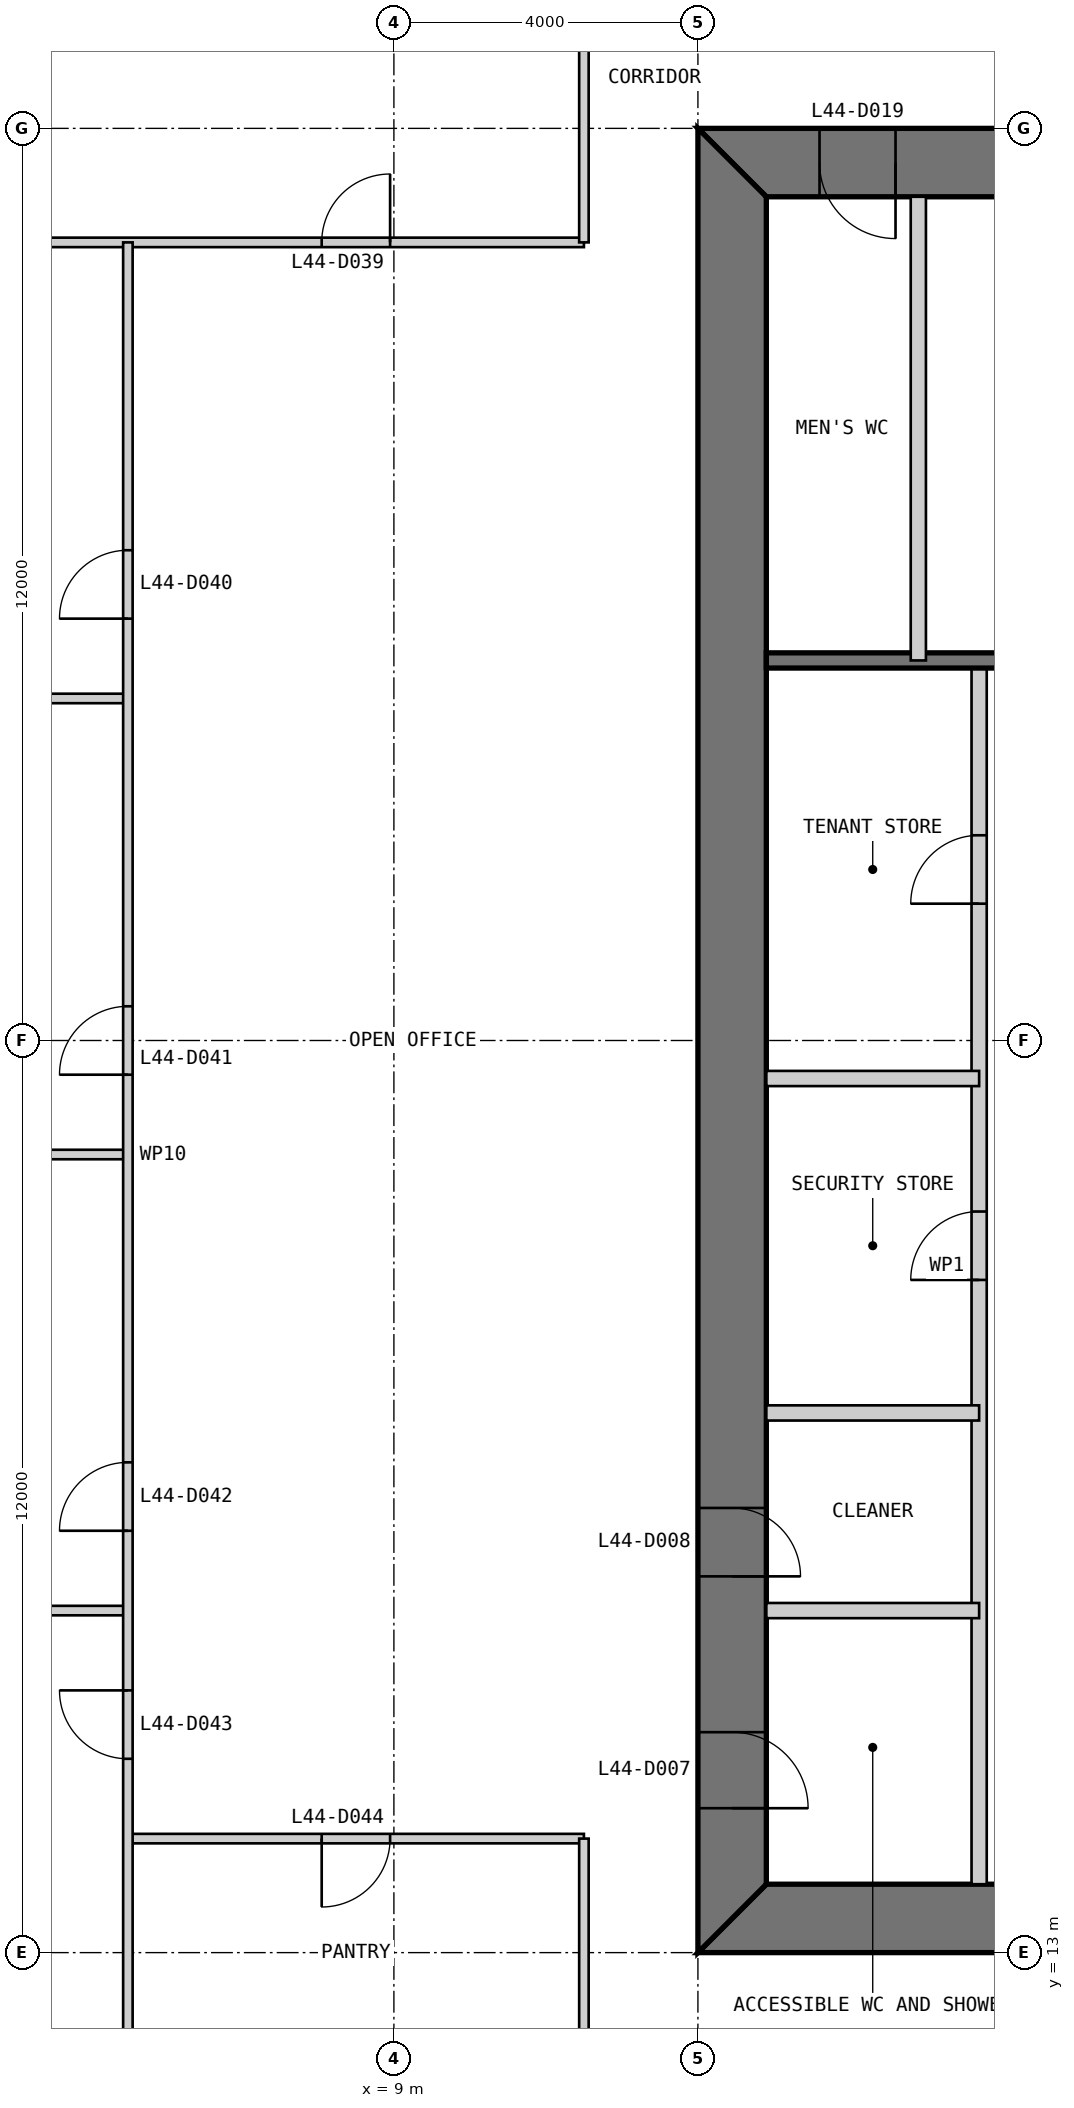
"""IFC4 building model, lengths in metres.
Left out: names, types, materials, properties, quantities, classifications, styles, units other than length and angle.
Written with IfcOpenShell. Run it as: python <this file> out.ifc"""

import sys

from ifc_helpers import new_model, si_unit, direction, frame, frame_2d, origin, place, context, subcontext, project, spatial, polyline, rectangle, outline, extrude, element, fill, save


model = new_model("IFC4")
c1 = context("Model", 3, precision=1e-05, world=origin(), true_north=direction((0.0, 1.0)))
c2 = subcontext(c1, "Body", "Model", "MODEL_VIEW")
j1 = project(units=[si_unit("LENGTHUNIT", "METRE"), si_unit("PLANEANGLEUNIT", "RADIAN")], contexts=[c1])
p1 = place(None, origin())
s1 = spatial("IfcSite", under=j1, at=p1, CompositionType="ELEMENT")
p2 = place(p1, origin())
s2 = spatial("IfcBuilding", under=s1, at=p2, CompositionType="ELEMENT")
p3 = place(p2, frame((0.0, 0.0, 189.8)))
s3 = spatial("IfcBuildingStorey", under=s2, at=p3, CompositionType="ELEMENT", Elevation=189.8)
p4 = place(p3, frame((13.0, 13.45, 0.0), z_axis=(0.0, 0.0, 1.0), x_axis=(1.0, 0.0, 0.0)))
e1 = element("IfcWall", 1, at=p4, inside=s3, PredefinedType="SHEAR", context=c2, shape_type="SweptSolid", body=[
    extrude(outline(polyline([(0.0, -0.45), (24.0, -0.45), (23.1, 0.45), (0.9, 0.45), (0.0, -0.45)])), origin(), (0.0, 0.0, 1.0), 4.0),
])
p5 = place(p4, frame((4.9, 0.0, 0.0)))
e2 = element("IfcOpeningElement", 2, at=p5, cuts=e1, PredefinedType="OPENING", context=c2, shape_type="SweptSolid", body=[
    extrude(rectangle(XDim=1.0, YDim=2.2, at=frame_2d((0.5, 1.1))), frame((0.0, 0.46, 0.0), z_axis=(0.0, -1.0, 0.0), x_axis=(1.0, 0.0, 0.0)), (0.0, 0.0, 1.0), 0.92),
])
p6 = place(p4, frame((8.9, 0.0, 0.0)))
e3 = element("IfcOpeningElement", 3, at=p6, cuts=e1, PredefinedType="OPENING", context=c2, shape_type="SweptSolid", body=[
    extrude(rectangle(XDim=1.1, YDim=2.2, at=frame_2d((0.55, 1.1))), frame((0.0, 0.46, 0.0), z_axis=(0.0, -1.0, 0.0), x_axis=(1.0, 0.0, 0.0)), (0.0, 0.0, 1.0), 0.92),
])
p7 = place(p4, frame((15.05, 0.0, 0.0)))
e4 = element("IfcOpeningElement", 4, at=p7, cuts=e1, PredefinedType="OPENING", context=c2, shape_type="SweptSolid", body=[
    extrude(rectangle(XDim=0.9, YDim=2.2, at=frame_2d((0.45, 1.1))), frame((0.0, 0.46, 0.0), z_axis=(0.0, -1.0, 0.0), x_axis=(1.0, 0.0, 0.0)), (0.0, 0.0, 1.0), 0.92),
])
p8 = place(p4, frame((17.9, 0.0, 0.0)))
e5 = element("IfcOpeningElement", 5, at=p8, cuts=e1, PredefinedType="OPENING", context=c2, shape_type="SweptSolid", body=[
    extrude(rectangle(XDim=1.0, YDim=2.2, at=frame_2d((0.5, 1.1))), frame((0.0, 0.46, 0.0), z_axis=(0.0, -1.0, 0.0), x_axis=(1.0, 0.0, 0.0)), (0.0, 0.0, 1.0), 0.92),
])
p9 = place(p4, frame((21.4, 0.0, 0.0)))
e6 = element("IfcOpeningElement", 6, at=p9, cuts=e1, PredefinedType="OPENING", context=c2, shape_type="SweptSolid", body=[
    extrude(rectangle(XDim=1.0, YDim=2.2, at=frame_2d((0.5, 1.1))), frame((0.0, 0.46, 0.0), z_axis=(0.0, -1.0, 0.0), x_axis=(1.0, 0.0, 0.0)), (0.0, 0.0, 1.0), 0.92),
])
p10 = place(p3, frame((37.0, 36.55, 0.0), z_axis=(0.0, 0.0, 1.0), x_axis=(-1.0, 0.0, 0.0)))
e7 = element("IfcWall", 7, at=p10, inside=s3, PredefinedType="SHEAR", context=c2, shape_type="SweptSolid", body=[
    extrude(outline(polyline([(0.0, -0.45), (24.0, -0.45), (23.1, 0.45), (0.9, 0.45), (0.0, -0.45)])), origin(), (0.0, 0.0, 1.0), 4.0),
])
p11 = place(p10, frame((4.9, 0.0, 0.0)))
e8 = element("IfcOpeningElement", 8, at=p11, cuts=e7, PredefinedType="OPENING", context=c2, shape_type="SweptSolid", body=[
    extrude(rectangle(XDim=1.0, YDim=2.2, at=frame_2d((0.5, 1.1))), frame((0.0, 0.46, 0.0), z_axis=(0.0, -1.0, 0.0), x_axis=(1.0, 0.0, 0.0)), (0.0, 0.0, 1.0), 0.92),
])
p12 = place(p10, frame((8.9, 0.0, 0.0)))
e9 = element("IfcOpeningElement", 9, at=p12, cuts=e7, PredefinedType="OPENING", context=c2, shape_type="SweptSolid", body=[
    extrude(rectangle(XDim=1.1, YDim=2.2, at=frame_2d((0.55, 1.1))), frame((0.0, 0.46, 0.0), z_axis=(0.0, -1.0, 0.0), x_axis=(1.0, 0.0, 0.0)), (0.0, 0.0, 1.0), 0.92),
])
p13 = place(p10, frame((15.05, 0.0, 0.0)))
e10 = element("IfcOpeningElement", 10, at=p13, cuts=e7, PredefinedType="OPENING", context=c2, shape_type="SweptSolid", body=[
    extrude(rectangle(XDim=0.9, YDim=2.2, at=frame_2d((0.45, 1.1))), frame((0.0, 0.46, 0.0), z_axis=(0.0, -1.0, 0.0), x_axis=(1.0, 0.0, 0.0)), (0.0, 0.0, 1.0), 0.92),
])
p14 = place(p10, frame((17.9, 0.0, 0.0)))
e11 = element("IfcOpeningElement", 11, at=p14, cuts=e7, PredefinedType="OPENING", context=c2, shape_type="SweptSolid", body=[
    extrude(rectangle(XDim=1.0, YDim=2.2, at=frame_2d((0.5, 1.1))), frame((0.0, 0.46, 0.0), z_axis=(0.0, -1.0, 0.0), x_axis=(1.0, 0.0, 0.0)), (0.0, 0.0, 1.0), 0.92),
])
p15 = place(p10, frame((21.4, 0.0, 0.0)))
e12 = element("IfcOpeningElement", 12, at=p15, cuts=e7, PredefinedType="OPENING", context=c2, shape_type="SweptSolid", body=[
    extrude(rectangle(XDim=1.0, YDim=2.2, at=frame_2d((0.5, 1.1))), frame((0.0, 0.46, 0.0), z_axis=(0.0, -1.0, 0.0), x_axis=(1.0, 0.0, 0.0)), (0.0, 0.0, 1.0), 0.92),
])
p16 = place(p3, frame((13.45, 36.1, 0.0), z_axis=(0.0, 0.0, 1.0), x_axis=(0.0, -1.0, 0.0)))
e13 = element("IfcWall", 13, at=p16, inside=s3, PredefinedType="SHEAR", context=c2, shape_type="SweptSolid", body=[
    extrude(outline(polyline([(-0.9, -0.45), (23.1, -0.45), (22.2, 0.45), (0.0, 0.45), (-0.9, -0.45)])), origin(), (0.0, 0.0, 1.0), 4.0),
])
p17 = place(p16, frame((20.2, 0.0, 0.0)))
e14 = element("IfcOpeningElement", 14, at=p17, cuts=e13, PredefinedType="OPENING", context=c2, shape_type="SweptSolid", body=[
    extrude(rectangle(XDim=1.0, YDim=2.2, at=frame_2d((0.5, 1.1))), frame((0.0, 0.46, 0.0), z_axis=(0.0, -1.0, 0.0), x_axis=(1.0, 0.0, 0.0)), (0.0, 0.0, 1.0), 0.92),
])
p18 = place(p16, frame((17.25, 0.0, 0.0)))
e15 = element("IfcOpeningElement", 15, at=p18, cuts=e13, PredefinedType="OPENING", context=c2, shape_type="SweptSolid", body=[
    extrude(rectangle(XDim=0.9, YDim=2.2, at=frame_2d((0.45, 1.1))), frame((0.0, 0.46, 0.0), z_axis=(0.0, -1.0, 0.0), x_axis=(1.0, 0.0, 0.0)), (0.0, 0.0, 1.0), 0.92),
])
p19 = place(p3, frame((16.7, 13.9, 0.0), z_axis=(0.0, 0.0, 1.0), x_axis=(0.0, 1.0, 0.0)))
e16 = element("IfcWall", 16, at=p19, inside=s3, PredefinedType="PARTITIONING", context=c2, shape_type="SweptSolid", body=[
    extrude(rectangle(XDim=16.1, YDim=0.2, at=frame_2d((8.05, 0.0))), origin(), (0.0, 0.0, 1.0), 3.8),
])
p20 = place(p19, frame((7.95, 0.0, 0.0)))
e17 = element("IfcOpeningElement", 17, at=p20, cuts=e16, PredefinedType="OPENING", context=c2, shape_type="SweptSolid", body=[
    extrude(rectangle(XDim=0.9, YDim=2.2, at=frame_2d((0.45, 1.1))), frame((0.0, 0.11, 0.0), z_axis=(0.0, -1.0, 0.0), x_axis=(1.0, 0.0, 0.0)), (0.0, 0.0, 1.0), 0.22),
])
p21 = place(p19, frame((12.9, 0.0, 0.0)))
e18 = element("IfcOpeningElement", 18, at=p21, cuts=e16, PredefinedType="OPENING", context=c2, shape_type="SweptSolid", body=[
    extrude(rectangle(XDim=0.9, YDim=2.2, at=frame_2d((0.45, 1.1))), frame((0.0, 0.11, 0.0), z_axis=(0.0, -1.0, 0.0), x_axis=(1.0, 0.0, 0.0)), (0.0, 0.0, 1.0), 0.22),
])
for number, where, z_axis, x_axis in (
    (19, (13.9, 17.5, 0.0), (0.0, 0.0, 1.0), (1.0, 0.0, 0.0)),
    (20, (13.9, 20.1, 0.0), (0.0, 0.0, 1.0), (1.0, 0.0, 0.0)),
    (21, (13.9, 24.5, 0.0), (0.0, 0.0, 1.0), (1.0, 0.0, 0.0)),
):
    element("IfcWall", number, at=place(p3, frame(where, z_axis=z_axis, x_axis=x_axis)), inside=s3, PredefinedType="PARTITIONING", context=c2, shape_type="SweptSolid", body=[
        extrude(rectangle(XDim=2.8, YDim=0.2, at=frame_2d((1.4, 0.0))), origin(), (0.0, 0.0, 1.0), 3.8),
    ])
p22 = place(p3, frame((29.7, 30.0, 0.0), z_axis=(0.0, 0.0, 1.0), x_axis=(-1.0, 0.0, 0.0)))
e22 = element("IfcWall", 22, at=p22, inside=s3, PredefinedType="SOLIDWALL", context=c2, shape_type="SweptSolid", body=[
    extrude(rectangle(XDim=15.8, YDim=0.2, at=frame_2d((7.9, 0.0))), origin(), (0.0, 0.0, 1.0), 3.8),
])
p23 = place(p3, frame((15.9, 36.1, 0.0), z_axis=(0.0, 0.0, 1.0), x_axis=(0.0, -1.0, 0.0)))
e23 = element("IfcWall", 23, at=p23, inside=s3, PredefinedType="PARTITIONING", context=c2, shape_type="SweptSolid", body=[
    extrude(rectangle(XDim=6.1, YDim=0.2, at=frame_2d((3.05, 0.0))), origin(), (0.0, 0.0, 1.0), 3.8),
])
p24 = place(p3, frame((0.15, 35.5, 0.0), z_axis=(0.0, 0.0, 1.0), x_axis=(1.0, 0.0, 0.0)))
e24 = element("IfcWall", 24, at=p24, inside=s3, PredefinedType="PARTITIONING", context=c2, shape_type="SweptSolid", body=[
    extrude(rectangle(XDim=11.35, YDim=0.125, at=frame_2d((5.675, 0.0))), origin(), (0.0, 0.0, 1.0), 3.85),
])
p25 = place(p24, frame((7.9, 0.0, 0.0)))
e25 = element("IfcOpeningElement", 25, at=p25, cuts=e24, PredefinedType="OPENING", context=c2, shape_type="SweptSolid", body=[
    extrude(rectangle(XDim=0.9, YDim=2.2, at=frame_2d((0.45, 1.1))), frame((0.0, 0.073, 0.0), z_axis=(0.0, -1.0, 0.0), x_axis=(1.0, 0.0, 0.0)), (0.0, 0.0, 1.0), 0.145),
])
for number, where, z_axis, x_axis in (
    (26, (0.15, 29.5, 0.0), (0.0, 0.0, 1.0), (1.0, 0.0, 0.0)),
    (27, (0.15, 23.5, 0.0), (0.0, 0.0, 1.0), (1.0, 0.0, 0.0)),
    (28, (0.15, 17.5, 0.0), (0.0, 0.0, 1.0), (1.0, 0.0, 0.0)),
):
    element("IfcWall", number, at=place(p3, frame(where, z_axis=z_axis, x_axis=x_axis)), inside=s3, PredefinedType="PARTITIONING", context=c2, shape_type="SweptSolid", body=[
        extrude(rectangle(XDim=5.35, YDim=0.125, at=frame_2d((2.675, 0.0))), origin(), (0.0, 0.0, 1.0), 3.85),
    ])
p26 = place(p3, frame((5.5, 14.5, 0.0), z_axis=(0.0, 0.0, 1.0), x_axis=(1.0, 0.0, 0.0)))
e29 = element("IfcWall", 29, at=p26, inside=s3, PredefinedType="PARTITIONING", context=c2, shape_type="SweptSolid", body=[
    extrude(rectangle(XDim=6.0, YDim=0.125, at=frame_2d((3.0, 0.0))), origin(), (0.0, 0.0, 1.0), 3.85),
])
p27 = place(p26, frame((2.55, 0.0, 0.0)))
e30 = element("IfcOpeningElement", 30, at=p27, cuts=e29, PredefinedType="OPENING", context=c2, shape_type="SweptSolid", body=[
    extrude(rectangle(XDim=0.9, YDim=2.2, at=frame_2d((0.45, 1.1))), frame((0.0, 0.073, 0.0), z_axis=(0.0, -1.0, 0.0), x_axis=(1.0, 0.0, 0.0)), (0.0, 0.0, 1.0), 0.145),
])
p28 = place(p3, frame((5.5, 35.5, 0.0), z_axis=(0.0, 0.0, 1.0), x_axis=(0.0, -1.0, 0.0)))
e31 = element("IfcWall", 31, at=p28, inside=s3, PredefinedType="PARTITIONING", context=c2, shape_type="SweptSolid", body=[
    extrude(rectangle(XDim=24.0, YDim=0.125, at=frame_2d((12.0, 0.0))), origin(), (0.0, 0.0, 1.0), 3.85),
])
p29 = place(p28, frame((4.05, 0.0, 0.0)))
e32 = element("IfcOpeningElement", 32, at=p29, cuts=e31, PredefinedType="OPENING", context=c2, shape_type="SweptSolid", body=[
    extrude(rectangle(XDim=0.9, YDim=2.2, at=frame_2d((0.45, 1.1))), frame((0.0, 0.073, 0.0), z_axis=(0.0, -1.0, 0.0), x_axis=(1.0, 0.0, 0.0)), (0.0, 0.0, 1.0), 0.145),
])
p30 = place(p28, frame((10.05, 0.0, 0.0)))
e33 = element("IfcOpeningElement", 33, at=p30, cuts=e31, PredefinedType="OPENING", context=c2, shape_type="SweptSolid", body=[
    extrude(rectangle(XDim=0.9, YDim=2.2, at=frame_2d((0.45, 1.1))), frame((0.0, 0.073, 0.0), z_axis=(0.0, -1.0, 0.0), x_axis=(1.0, 0.0, 0.0)), (0.0, 0.0, 1.0), 0.145),
])
p31 = place(p28, frame((16.05, 0.0, 0.0)))
e34 = element("IfcOpeningElement", 34, at=p31, cuts=e31, PredefinedType="OPENING", context=c2, shape_type="SweptSolid", body=[
    extrude(rectangle(XDim=0.9, YDim=2.2, at=frame_2d((0.45, 1.1))), frame((0.0, 0.073, 0.0), z_axis=(0.0, -1.0, 0.0), x_axis=(1.0, 0.0, 0.0)), (0.0, 0.0, 1.0), 0.145),
])
p32 = place(p28, frame((19.05, 0.0, 0.0)))
e35 = element("IfcOpeningElement", 35, at=p32, cuts=e31, PredefinedType="OPENING", context=c2, shape_type="SweptSolid", body=[
    extrude(rectangle(XDim=0.9, YDim=2.2, at=frame_2d((0.45, 1.1))), frame((0.0, 0.073, 0.0), z_axis=(0.0, -1.0, 0.0), x_axis=(1.0, 0.0, 0.0)), (0.0, 0.0, 1.0), 0.145),
])
for number, where, z_axis, x_axis in (
    (36, (11.5, 38.5, 0.0), (0.0, 0.0, 1.0), (0.0, -1.0, 0.0)),
    (37, (11.5, 14.5, 0.0), (0.0, 0.0, 1.0), (0.0, -1.0, 0.0)),
):
    element("IfcWall", number, at=place(p3, frame(where, z_axis=z_axis, x_axis=x_axis)), inside=s3, PredefinedType="PARTITIONING", context=c2, shape_type="SweptSolid", body=[
        extrude(rectangle(XDim=3.0, YDim=0.125, at=frame_2d((1.5, 0.0))), origin(), (0.0, 0.0, 1.0), 3.85),
    ])
p33 = place(p17, origin())
e38 = element("IfcDoor", 38, at=p33, inside=s3, OperationType="SINGLE_SWING_RIGHT", PredefinedType="DOOR", context=c2, shape_type="SweptSolid", body=[
    extrude(rectangle(XDim=1.0, YDim=2.2, at=frame_2d((0.5, 1.1))), frame((0.0, 0.025, 0.0), z_axis=(0.0, -1.0, 0.0), x_axis=(1.0, 0.0, 0.0)), (0.0, 0.0, 1.0), 0.05),
    extrude(outline(polyline([(0.0, 0.0), (0.04, 0.0), (0.04, 2.16), (0.96, 2.16), (0.96, 0.0), (1.0, 0.0), (1.0, 2.2), (0.0, 2.2), (0.0, 0.0)])), frame((0.0, 0.3, 0.0), z_axis=(0.0, -1.0, 0.0), x_axis=(1.0, 0.0, 0.0)), (0.0, 0.0, 1.0), 0.6),
])
fill(e14, e38)
p34 = place(p18, origin())
e39 = element("IfcDoor", 39, at=p34, inside=s3, OperationType="SINGLE_SWING_RIGHT", PredefinedType="DOOR", context=c2, shape_type="SweptSolid", body=[
    extrude(rectangle(XDim=0.9, YDim=2.2, at=frame_2d((0.45, 1.1))), frame((0.0, 0.025, 0.0), z_axis=(0.0, -1.0, 0.0), x_axis=(1.0, 0.0, 0.0)), (0.0, 0.0, 1.0), 0.05),
    extrude(outline(polyline([(0.0, 0.0), (0.04, 0.0), (0.04, 2.16), (0.86, 2.16), (0.86, 0.0), (0.9, 0.0), (0.9, 2.2), (0.0, 2.2), (0.0, 0.0)])), frame((0.0, 0.3, 0.0), z_axis=(0.0, -1.0, 0.0), x_axis=(1.0, 0.0, 0.0)), (0.0, 0.0, 1.0), 0.6),
])
fill(e15, e39)
p35 = place(p20, origin())
e40 = element("IfcDoor", 40, at=p35, inside=s3, OperationType="SINGLE_SWING_LEFT", PredefinedType="DOOR", context=c2, shape_type="SweptSolid", body=[
    extrude(rectangle(XDim=0.9, YDim=2.2, at=frame_2d((0.45, 1.1))), frame((0.0, 0.025, 0.0), z_axis=(0.0, -1.0, 0.0), x_axis=(1.0, 0.0, 0.0)), (0.0, 0.0, 1.0), 0.05),
])
fill(e17, e40)
p36 = place(p21, origin())
e41 = element("IfcDoor", 41, at=p36, inside=s3, OperationType="SINGLE_SWING_LEFT", PredefinedType="DOOR", context=c2, shape_type="SweptSolid", body=[
    extrude(rectangle(XDim=0.9, YDim=2.2, at=frame_2d((0.45, 1.1))), frame((0.0, 0.025, 0.0), z_axis=(0.0, -1.0, 0.0), x_axis=(1.0, 0.0, 0.0)), (0.0, 0.0, 1.0), 0.05),
])
fill(e18, e41)
p37 = place(p15, origin())
e42 = element("IfcDoor", 42, at=p37, inside=s3, OperationType="SINGLE_SWING_LEFT", PredefinedType="DOOR", context=c2, shape_type="SweptSolid", body=[
    extrude(rectangle(XDim=1.0, YDim=2.2, at=frame_2d((0.5, 1.1))), frame((0.0, 0.025, 0.0), z_axis=(0.0, -1.0, 0.0), x_axis=(1.0, 0.0, 0.0)), (0.0, 0.0, 1.0), 0.05),
    extrude(outline(polyline([(0.0, 0.0), (0.04, 0.0), (0.04, 2.16), (0.96, 2.16), (0.96, 0.0), (1.0, 0.0), (1.0, 2.2), (0.0, 2.2), (0.0, 0.0)])), frame((0.0, 0.3, 0.0), z_axis=(0.0, -1.0, 0.0), x_axis=(1.0, 0.0, 0.0)), (0.0, 0.0, 1.0), 0.6),
])
fill(e12, e42)
p38 = place(p25, origin())
e43 = element("IfcDoor", 43, at=p38, inside=s3, OperationType="SINGLE_SWING_RIGHT", PredefinedType="DOOR", context=c2, shape_type="SweptSolid", body=[
    extrude(rectangle(XDim=0.9, YDim=2.2, at=frame_2d((0.45, 1.1))), frame((0.0, 0.025, 0.0), z_axis=(0.0, -1.0, 0.0), x_axis=(1.0, 0.0, 0.0)), (0.0, 0.0, 1.0), 0.05),
])
fill(e25, e43)
p39 = place(p29, frame((0.9, 0.0, 0.0), z_axis=(0.0, 0.0, 1.0), x_axis=(-1.0, 0.0, 0.0)))
e44 = element("IfcDoor", 44, at=p39, inside=s3, OperationType="SINGLE_SWING_LEFT", PredefinedType="DOOR", context=c2, shape_type="SweptSolid", body=[
    extrude(rectangle(XDim=0.9, YDim=2.2, at=frame_2d((0.45, 1.1))), frame((0.0, 0.025, 0.0), z_axis=(0.0, -1.0, 0.0), x_axis=(1.0, 0.0, 0.0)), (0.0, 0.0, 1.0), 0.05),
])
fill(e32, e44)
p40 = place(p30, frame((0.9, 0.0, 0.0), z_axis=(0.0, 0.0, 1.0), x_axis=(-1.0, 0.0, 0.0)))
e45 = element("IfcDoor", 45, at=p40, inside=s3, OperationType="SINGLE_SWING_LEFT", PredefinedType="DOOR", context=c2, shape_type="SweptSolid", body=[
    extrude(rectangle(XDim=0.9, YDim=2.2, at=frame_2d((0.45, 1.1))), frame((0.0, 0.025, 0.0), z_axis=(0.0, -1.0, 0.0), x_axis=(1.0, 0.0, 0.0)), (0.0, 0.0, 1.0), 0.05),
])
fill(e33, e45)
p41 = place(p31, frame((0.9, 0.0, 0.0), z_axis=(0.0, 0.0, 1.0), x_axis=(-1.0, 0.0, 0.0)))
e46 = element("IfcDoor", 46, at=p41, inside=s3, OperationType="SINGLE_SWING_LEFT", PredefinedType="DOOR", context=c2, shape_type="SweptSolid", body=[
    extrude(rectangle(XDim=0.9, YDim=2.2, at=frame_2d((0.45, 1.1))), frame((0.0, 0.025, 0.0), z_axis=(0.0, -1.0, 0.0), x_axis=(1.0, 0.0, 0.0)), (0.0, 0.0, 1.0), 0.05),
])
fill(e34, e46)
p42 = place(p32, frame((0.9, 0.0, 0.0), z_axis=(0.0, 0.0, 1.0), x_axis=(-1.0, 0.0, 0.0)))
e47 = element("IfcDoor", 47, at=p42, inside=s3, OperationType="SINGLE_SWING_RIGHT", PredefinedType="DOOR", context=c2, shape_type="SweptSolid", body=[
    extrude(rectangle(XDim=0.9, YDim=2.2, at=frame_2d((0.45, 1.1))), frame((0.0, 0.025, 0.0), z_axis=(0.0, -1.0, 0.0), x_axis=(1.0, 0.0, 0.0)), (0.0, 0.0, 1.0), 0.05),
])
fill(e35, e47)
p43 = place(p27, frame((0.9, 0.0, 0.0), z_axis=(0.0, 0.0, 1.0), x_axis=(-1.0, 0.0, 0.0)))
e48 = element("IfcDoor", 48, at=p43, inside=s3, OperationType="SINGLE_SWING_RIGHT", PredefinedType="DOOR", context=c2, shape_type="SweptSolid", body=[
    extrude(rectangle(XDim=0.9, YDim=2.2, at=frame_2d((0.45, 1.1))), frame((0.0, 0.025, 0.0), z_axis=(0.0, -1.0, 0.0), x_axis=(1.0, 0.0, 0.0)), (0.0, 0.0, 1.0), 0.05),
])
fill(e30, e48)
save(model, sys.argv[1])
